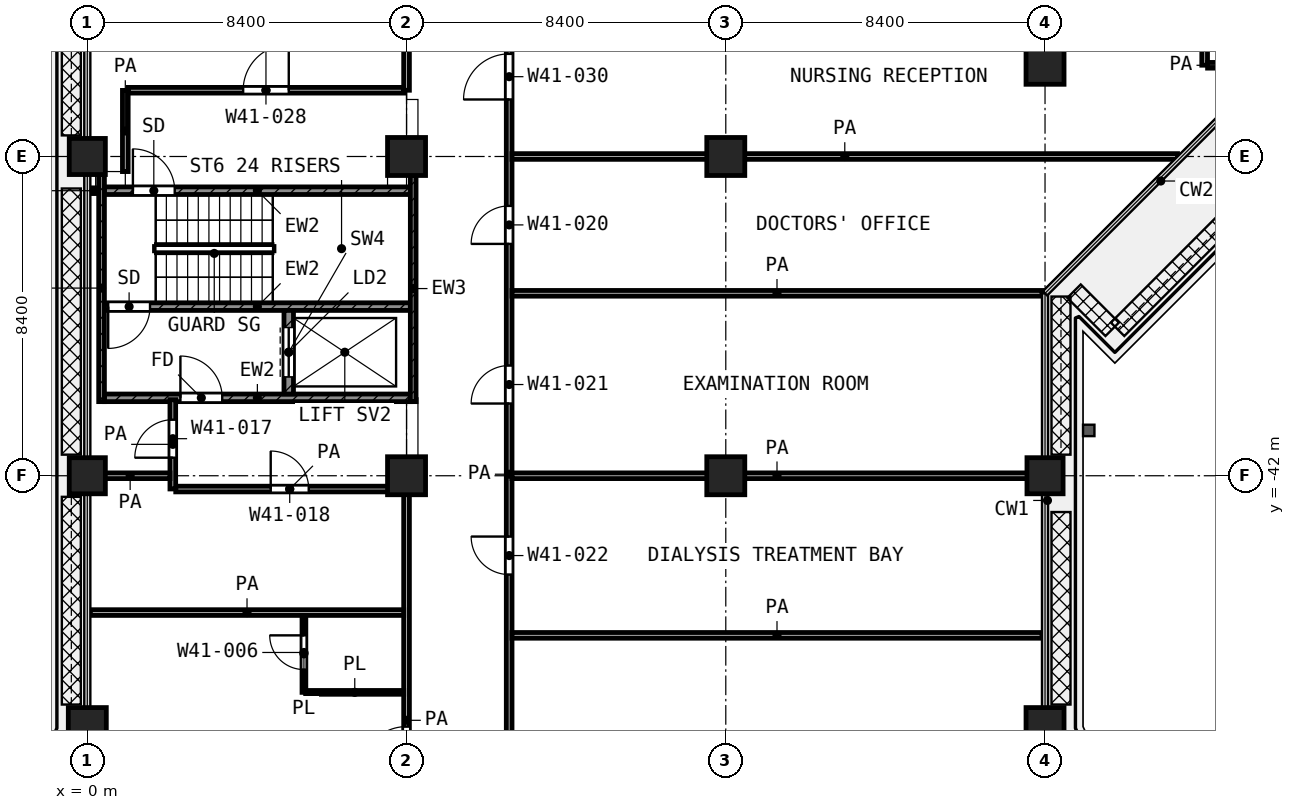
"""IFC4 building model, lengths in metres.
Left out: names, types, materials, properties, quantities, classifications, styles, units other than length and angle.
Written with IfcOpenShell. Run it as: python <this file> out.ifc"""

import sys

from ifc_helpers import new_model, si_unit, direction, frame, frame_2d, origin, origin_2d, place, context, subcontext, project, spatial, rectangle, extrude, element, fill, save


model = new_model("IFC4")
c1 = context("Model", 3, precision=1e-05, world=origin(), true_north=direction((0.0, 1.0)))
c2 = subcontext(c1, "Body", "Model", "MODEL_VIEW")
j1 = project(units=[si_unit("LENGTHUNIT", "METRE"), si_unit("PLANEANGLEUNIT", "RADIAN")], contexts=[c1])
p1 = place(None, origin())
s1 = spatial("IfcSite", under=j1, at=p1, CompositionType="ELEMENT")
p2 = place(p1, origin())
s2 = spatial("IfcBuilding", under=s1, at=p2, CompositionType="ELEMENT")
p3 = place(p2, frame((0.0, 0.0, 200.4)))
s3 = spatial("IfcBuildingStorey", under=s2, at=p3, CompositionType="ELEMENT", Elevation=200.4)
p4 = place(p3, frame((25.2, -31.2, 0.0), z_axis=(0.0, 0.0, 1.0), x_axis=(1.0, 0.0, 0.0)))
e1 = element("IfcColumn", 1, at=p4, inside=s3, PredefinedType="COLUMN", context=c2, shape_type="SweptSolid", body=[
    extrude(rectangle(XDim=1.0, YDim=1.0, at=origin_2d()), origin(), (0.0, 0.0, 1.0), 4.2),
])
p5 = place(p3, frame((0.0, -33.6, 0.0), z_axis=(0.0, 0.0, 1.0), x_axis=(1.0, 0.0, 0.0)))
e2 = element("IfcColumn", 2, at=p5, inside=s3, PredefinedType="COLUMN", context=c2, shape_type="SweptSolid", body=[
    extrude(rectangle(XDim=0.95, YDim=0.95, at=origin_2d()), origin(), (0.0, 0.0, 1.0), 4.2),
])
for number, where, z_axis, x_axis in (
    (3, (8.4, -33.6, 0.0), (0.0, 0.0, 1.0), (1.0, 0.0, 0.0)),
    (4, (16.8, -33.6, 0.0), (0.0, 0.0, 1.0), (1.0, 0.0, 0.0)),
):
    element("IfcColumn", number, at=place(p3, frame(where, z_axis=z_axis, x_axis=x_axis)), inside=s3, PredefinedType="COLUMN", context=c2, shape_type="SweptSolid", body=[
        extrude(rectangle(XDim=1.0, YDim=1.0, at=origin_2d()), origin(), (0.0, 0.0, 1.0), 4.2),
    ])
p6 = place(p3, frame((0.0, -42.0, 0.0), z_axis=(0.0, 0.0, 1.0), x_axis=(1.0, 0.0, 0.0)))
e5 = element("IfcColumn", 5, at=p6, inside=s3, PredefinedType="COLUMN", context=c2, shape_type="SweptSolid", body=[
    extrude(rectangle(XDim=0.95, YDim=0.95, at=origin_2d()), origin(), (0.0, 0.0, 1.0), 4.2),
])
for number, where, z_axis, x_axis in (
    (6, (8.4, -42.0, 0.0), (0.0, 0.0, 1.0), (1.0, 0.0, 0.0)),
    (7, (16.8, -42.0, 0.0), (0.0, 0.0, 1.0), (1.0, 0.0, 0.0)),
):
    element("IfcColumn", number, at=place(p3, frame(where, z_axis=z_axis, x_axis=x_axis)), inside=s3, PredefinedType="COLUMN", context=c2, shape_type="SweptSolid", body=[
        extrude(rectangle(XDim=1.0, YDim=1.0, at=origin_2d()), origin(), (0.0, 0.0, 1.0), 4.2),
    ])
p7 = place(p3, frame((25.2, -42.0, 0.0), z_axis=(0.0, 0.0, 1.0), x_axis=(1.0, 0.0, 0.0)))
e8 = element("IfcColumn", 8, at=p7, inside=s3, PredefinedType="COLUMN", context=c2, shape_type="SweptSolid", body=[
    extrude(rectangle(XDim=0.95, YDim=0.95, at=origin_2d()), origin(), (0.0, 0.0, 1.0), 4.2),
])
for number, where, z_axis, x_axis in (
    (9, (0.0, -48.6, 0.0), (0.0, 0.0, 1.0), (1.0, 0.0, 0.0)),
    (10, (25.2, -48.6, 0.0), (0.0, 0.0, 1.0), (1.0, 0.0, 0.0)),
):
    element("IfcColumn", number, at=place(p3, frame(where, z_axis=z_axis, x_axis=x_axis)), inside=s3, PredefinedType="COLUMN", context=c2, shape_type="SweptSolid", body=[
        extrude(rectangle(XDim=1.0, YDim=1.0, at=origin_2d()), origin(), (0.0, 0.0, 1.0), 4.2),
    ])
p8 = place(p3, frame((0.375, -40.05, 0.0), z_axis=(0.0, 0.0, 1.0), x_axis=(0.0, 1.0, 0.0)))
e11 = element("IfcWall", 11, at=p8, inside=s3, PredefinedType="SHEAR", context=c2, shape_type="SweptSolid", body=[
    extrude(rectangle(XDim=5.975, YDim=0.15, at=frame_2d((2.988, 0.0))), origin(), (0.0, 0.0, 1.0), 3.6),
])
p9 = place(p3, frame((8.575, -40.05, 0.0), z_axis=(0.0, 0.0, 1.0), x_axis=(0.0, 1.0, 0.0)))
e12 = element("IfcWall", 12, at=p9, inside=s3, PredefinedType="SHEAR", context=c2, shape_type="SweptSolid", body=[
    extrude(rectangle(XDim=5.95, YDim=0.15, at=frame_2d((2.975, 0.0))), origin(), (0.0, 0.0, 1.0), 3.6),
])
p10 = place(p3, frame((0.45, -34.5, 0.0), z_axis=(0.0, 0.0, 1.0), x_axis=(1.0, 0.0, 0.0)))
e13 = element("IfcWall", 13, at=p10, inside=s3, PredefinedType="SHEAR", context=c2, shape_type="SweptSolid", body=[
    extrude(rectangle(XDim=8.05, YDim=0.2, at=frame_2d((4.025, 0.0))), origin(), (0.0, 0.0, 1.0), 3.6),
])
p11 = place(p10, frame((0.75, 0.0, 0.0)))
e14 = element("IfcOpeningElement", 14, at=p11, cuts=e13, PredefinedType="OPENING", context=c2, shape_type="SweptSolid", body=[
    extrude(rectangle(XDim=1.1, YDim=2.1, at=frame_2d((0.55, 1.05))), frame((0.0, 0.11, 0.0), z_axis=(0.0, -1.0, 0.0), x_axis=(1.0, 0.0, 0.0)), (0.0, 0.0, 1.0), 0.22),
])
p12 = place(p3, frame((0.45, -37.55, 0.0), z_axis=(0.0, 0.0, 1.0), x_axis=(1.0, 0.0, 0.0)))
e15 = element("IfcWall", 15, at=p12, inside=s3, PredefinedType="SHEAR", context=c2, shape_type="SweptSolid", body=[
    extrude(rectangle(XDim=8.05, YDim=0.2, at=frame_2d((4.025, 0.0))), origin(), (0.0, 0.0, 1.0), 3.6),
])
p13 = place(p12, frame((0.1, 0.0, 0.0)))
e16 = element("IfcOpeningElement", 16, at=p13, cuts=e15, PredefinedType="OPENING", context=c2, shape_type="SweptSolid", body=[
    extrude(rectangle(XDim=1.1, YDim=2.1, at=frame_2d((0.55, 1.05))), frame((0.0, 0.11, 0.0), z_axis=(0.0, -1.0, 0.0), x_axis=(1.0, 0.0, 0.0)), (0.0, 0.0, 1.0), 0.22),
])
p14 = place(p3, frame((0.45, -39.95, 0.0), z_axis=(0.0, 0.0, 1.0), x_axis=(1.0, 0.0, 0.0)))
e17 = element("IfcWall", 17, at=p14, inside=s3, PredefinedType="SHEAR", context=c2, shape_type="SweptSolid", body=[
    extrude(rectangle(XDim=8.05, YDim=0.2, at=frame_2d((4.025, 0.0))), origin(), (0.0, 0.0, 1.0), 3.6),
])
p15 = place(p14, frame((2.0, 0.0, 0.0)))
e18 = element("IfcOpeningElement", 18, at=p15, cuts=e17, PredefinedType="OPENING", context=c2, shape_type="SweptSolid", body=[
    extrude(rectangle(XDim=1.1, YDim=2.1, at=frame_2d((0.55, 1.05))), frame((0.0, 0.11, 0.0), z_axis=(0.0, -1.0, 0.0), x_axis=(1.0, 0.0, 0.0)), (0.0, 0.0, 1.0), 0.22),
])
p16 = place(p3, frame((5.3, -39.85, 0.0), z_axis=(0.0, 0.0, 1.0), x_axis=(0.0, 1.0, 0.0)))
e19 = element("IfcWall", 19, at=p16, inside=s3, PredefinedType="SHEAR", context=c2, shape_type="SweptSolid", body=[
    extrude(rectangle(XDim=2.2, YDim=0.25, at=frame_2d((1.1, 0.0))), origin(), (0.0, 0.0, 1.0), 3.6),
])
p17 = place(p16, frame((0.45, 0.0, 0.0)))
e20 = element("IfcOpeningElement", 20, at=p17, cuts=e19, PredefinedType="OPENING", context=c2, shape_type="SweptSolid", body=[
    extrude(rectangle(XDim=1.3, YDim=2.1, at=frame_2d((0.65, 1.05))), frame((0.0, 0.135, 0.0), z_axis=(0.0, -1.0, 0.0), x_axis=(1.0, 0.0, 0.0)), (0.0, 0.0, 1.0), 0.27),
])
p18 = place(p3, frame((5.75, -47.7, 0.0), z_axis=(0.0, 0.0, 1.0), x_axis=(1.0, 0.0, 0.0)))
e21 = element("IfcWall", 21, at=p18, inside=s3, PredefinedType="PARTITIONING", context=c2, shape_type="SweptSolid", body=[
    extrude(rectangle(XDim=2.575, YDim=0.1, at=frame_2d((1.288, 0.0))), origin(), (0.0, 0.0, 1.0), 3.6),
])
p19 = place(p3, frame((5.7, -47.7, 0.0), z_axis=(0.0, 0.0, 1.0), x_axis=(0.0, 1.0, 0.0)))
e22 = element("IfcWall", 22, at=p19, inside=s3, PredefinedType="PARTITIONING", context=c2, shape_type="SweptSolid", body=[
    extrude(rectangle(XDim=2.025, YDim=0.1, at=frame_2d((1.012, 0.0))), origin(), (0.0, 0.0, 1.0), 3.6),
])
p20 = place(p19, frame((0.6, 0.0, 0.0)))
e23 = element("IfcOpeningElement", 23, at=p20, cuts=e22, PredefinedType="OPENING", context=c2, shape_type="SweptSolid", body=[
    extrude(rectangle(XDim=0.9, YDim=2.1, at=frame_2d((0.45, 1.05))), frame((0.0, 0.06, 0.0), z_axis=(0.0, -1.0, 0.0), x_axis=(1.0, 0.0, 0.0)), (0.0, 0.0, 1.0), 0.12),
])
p21 = place(p3, frame((11.175, -46.2, 0.0), z_axis=(0.0, 0.0, 1.0), x_axis=(1.0, 0.0, 0.0)))
e24 = element("IfcWall", 24, at=p21, inside=s3, PredefinedType="PARTITIONING", context=c2, shape_type="SweptSolid", body=[
    extrude(rectangle(XDim=13.945, YDim=0.15, at=frame_2d((6.973, 0.0))), origin(), (0.0, 0.0, 1.0), 3.6),
])
p22 = place(p3, frame((0.08, -45.6, 0.0), z_axis=(0.0, 0.0, 1.0), x_axis=(1.0, 0.0, 0.0)))
e25 = element("IfcWall", 25, at=p22, inside=s3, PredefinedType="PARTITIONING", context=c2, shape_type="SweptSolid", body=[
    extrude(rectangle(XDim=8.245, YDim=0.15, at=frame_2d((4.123, 0.0))), origin(), (0.0, 0.0, 1.0), 3.6),
])
p23 = place(p3, frame((2.327, -42.35, 0.0), z_axis=(0.0, 0.0, 1.0), x_axis=(1.0, 0.0, 0.0)))
e26 = element("IfcWall", 26, at=p23, inside=s3, PredefinedType="PARTITIONING", context=c2, shape_type="SweptSolid", body=[
    extrude(rectangle(XDim=5.998, YDim=0.15, at=frame_2d((2.999, 0.0))), origin(), (0.0, 0.0, 1.0), 3.6),
])
p24 = place(p23, frame((2.499, 0.0, 0.0)))
e27 = element("IfcOpeningElement", 27, at=p24, cuts=e26, PredefinedType="OPENING", context=c2, shape_type="SweptSolid", body=[
    extrude(rectangle(XDim=1.0, YDim=2.1, at=frame_2d((0.5, 1.05))), frame((0.0, 0.085, 0.0), z_axis=(0.0, -1.0, 0.0), x_axis=(1.0, 0.0, 0.0)), (0.0, 0.0, 1.0), 0.17),
])
p25 = place(p3, frame((0.08, -42.0, 0.0), z_axis=(0.0, 0.0, 1.0), x_axis=(1.0, 0.0, 0.0)))
e28 = element("IfcWall", 28, at=p25, inside=s3, PredefinedType="PARTITIONING", context=c2, shape_type="SweptSolid", body=[
    extrude(rectangle(XDim=2.095, YDim=0.15, at=frame_2d((1.047, 0.0))), origin(), (0.0, 0.0, 1.0), 3.6),
])
for number, where, z_axis, x_axis in (
    (29, (11.175, -42.0, 0.0), (0.0, 0.0, 1.0), (1.0, 0.0, 0.0)),
    (30, (11.175, -37.2, 0.0), (0.0, 0.0, 1.0), (1.0, 0.0, 0.0)),
):
    element("IfcWall", number, at=place(p3, frame(where, z_axis=z_axis, x_axis=x_axis)), inside=s3, PredefinedType="PARTITIONING", context=c2, shape_type="SweptSolid", body=[
        extrude(rectangle(XDim=13.945, YDim=0.15, at=frame_2d((6.973, 0.0))), origin(), (0.0, 0.0, 1.0), 3.6),
    ])
p26 = place(p3, frame((0.08, -34.5, 0.0), z_axis=(0.0, 0.0, 1.0), x_axis=(1.0, 0.0, 0.0)))
e31 = element("IfcWall", 31, at=p26, inside=s3, PredefinedType="PARTITIONING", context=c2, shape_type="SweptSolid", body=[
    extrude(rectangle(XDim=0.19, YDim=0.15, at=frame_2d((0.095, 0.0))), origin(), (0.0, 0.0, 1.0), 3.6),
])
p27 = place(p3, frame((11.175, -33.6, 0.0), z_axis=(0.0, 0.0, 1.0), x_axis=(1.0, 0.0, 0.0)))
e32 = element("IfcWall", 32, at=p27, inside=s3, PredefinedType="PARTITIONING", context=c2, shape_type="SweptSolid", body=[
    extrude(rectangle(XDim=17.512, YDim=0.15, at=frame_2d((8.756, 0.0))), origin(), (0.0, 0.0, 1.0), 3.6),
])
p28 = place(p3, frame((1.077, -31.857, 0.0), z_axis=(0.0, 0.0, 1.0), x_axis=(1.0, 0.0, 0.0)))
e33 = element("IfcWall", 33, at=p28, inside=s3, PredefinedType="PARTITIONING", context=c2, shape_type="SweptSolid", body=[
    extrude(rectangle(XDim=7.248, YDim=0.15, at=frame_2d((3.624, 0.0))), origin(), (0.0, 0.0, 1.0), 3.6),
])
p29 = place(p28, frame((3.024, 0.0, 0.0)))
e34 = element("IfcOpeningElement", 34, at=p29, cuts=e33, PredefinedType="OPENING", context=c2, shape_type="SweptSolid", body=[
    extrude(rectangle(XDim=1.2, YDim=2.1, at=frame_2d((0.6, 1.05))), frame((0.0, 0.085, 0.0), z_axis=(0.0, -1.0, 0.0), x_axis=(1.0, 0.0, 0.0)), (0.0, 0.0, 1.0), 0.17),
])
p30 = place(p3, frame((29.477, -31.2, 0.0), z_axis=(0.0, 0.0, 1.0), x_axis=(1.0, 0.0, 0.0)))
e35 = element("IfcWall", 35, at=p30, inside=s3, PredefinedType="PARTITIONING", context=c2, shape_type="SweptSolid", body=[
    extrude(rectangle(XDim=1.61, YDim=0.15, at=frame_2d((0.805, 0.0))), origin(), (0.0, 0.0, 1.0), 3.6),
])
p31 = place(p3, frame((1.0, -33.997, 0.0), z_axis=(0.0, 0.0, 1.0), x_axis=(0.0, 1.0, 0.0)))
e36 = element("IfcWall", 36, at=p31, inside=s3, PredefinedType="PARTITIONING", context=c2, shape_type="SweptSolid", body=[
    extrude(rectangle(XDim=2.136, YDim=0.15, at=frame_2d((1.068, 0.0))), origin(), (0.0, 0.0, 1.0), 3.6),
])
p32 = place(p3, frame((2.25, -42.348, 0.0), z_axis=(0.0, 0.0, 1.0), x_axis=(0.0, 1.0, 0.0)))
e37 = element("IfcWall", 37, at=p32, inside=s3, PredefinedType="PARTITIONING", context=c2, shape_type="SweptSolid", body=[
    extrude(rectangle(XDim=2.348, YDim=0.15, at=frame_2d((1.174, 0.0))), origin(), (0.0, 0.0, 1.0), 3.6),
])
p33 = place(p32, frame((0.823, 0.0, 0.0)))
e38 = element("IfcOpeningElement", 38, at=p33, cuts=e37, PredefinedType="OPENING", context=c2, shape_type="SweptSolid", body=[
    extrude(rectangle(XDim=1.0, YDim=2.1, at=frame_2d((0.5, 1.05))), frame((0.0, 0.085, 0.0), z_axis=(0.0, -1.0, 0.0), x_axis=(1.0, 0.0, 0.0)), (0.0, 0.0, 1.0), 0.17),
])
p34 = place(p3, frame((8.4, -54.52, 0.0), z_axis=(0.0, 0.0, 1.0), x_axis=(0.0, 1.0, 0.0)))
e39 = element("IfcWall", 39, at=p34, inside=s3, PredefinedType="PARTITIONING", context=c2, shape_type="SweptSolid", body=[
    extrude(rectangle(XDim=12.17, YDim=0.15, at=frame_2d((6.085, 0.0))), origin(), (0.0, 0.0, 1.0), 3.6),
])
p35 = place(p34, frame((4.72, 0.0, 0.0)))
e40 = element("IfcOpeningElement", 40, at=p35, cuts=e39, PredefinedType="OPENING", context=c2, shape_type="SweptSolid", body=[
    extrude(rectangle(XDim=1.2, YDim=2.1, at=frame_2d((0.6, 1.05))), frame((0.0, 0.085, 0.0), z_axis=(0.0, -1.0, 0.0), x_axis=(1.0, 0.0, 0.0)), (0.0, 0.0, 1.0), 0.17),
])
p36 = place(p34, frame((1.52, 0.0, 0.0)))
e41 = element("IfcOpeningElement", 41, at=p36, cuts=e39, PredefinedType="OPENING", context=c2, shape_type="SweptSolid", body=[
    extrude(rectangle(XDim=1.0, YDim=2.1, at=frame_2d((0.5, 1.05))), frame((0.0, 0.085, 0.0), z_axis=(0.0, -1.0, 0.0), x_axis=(1.0, 0.0, 0.0)), (0.0, 0.0, 1.0), 0.17),
])
p37 = place(p3, frame((8.4, -31.857, 0.0), z_axis=(0.0, 0.0, 1.0), x_axis=(0.0, 1.0, 0.0)))
e42 = element("IfcWall", 42, at=p37, inside=s3, PredefinedType="PARTITIONING", context=c2, shape_type="SweptSolid", body=[
    extrude(rectangle(XDim=6.957, YDim=0.15, at=frame_2d((3.479, 0.0))), origin(), (0.0, 0.0, 1.0), 3.6),
])
p38 = place(p3, frame((11.1, -54.52, 0.0), z_axis=(0.0, 0.0, 1.0), x_axis=(0.0, 1.0, 0.0)))
e43 = element("IfcWall", 43, at=p38, inside=s3, PredefinedType="PARTITIONING", context=c2, shape_type="SweptSolid", body=[
    extrude(rectangle(XDim=25.12, YDim=0.15, at=frame_2d((12.56, 0.0))), origin(), (0.0, 0.0, 1.0), 3.6),
])
p39 = place(p38, frame((22.42, 0.0, 0.0)))
e44 = element("IfcOpeningElement", 44, at=p39, cuts=e43, PredefinedType="OPENING", context=c2, shape_type="SweptSolid", body=[
    extrude(rectangle(XDim=1.2, YDim=2.1, at=frame_2d((0.6, 1.05))), frame((0.0, 0.085, 0.0), z_axis=(0.0, -1.0, 0.0), x_axis=(1.0, 0.0, 0.0)), (0.0, 0.0, 1.0), 0.17),
])
p40 = place(p38, frame((18.62, 0.0, 0.0)))
e45 = element("IfcOpeningElement", 45, at=p40, cuts=e43, PredefinedType="OPENING", context=c2, shape_type="SweptSolid", body=[
    extrude(rectangle(XDim=1.0, YDim=2.1, at=frame_2d((0.5, 1.05))), frame((0.0, 0.085, 0.0), z_axis=(0.0, -1.0, 0.0), x_axis=(1.0, 0.0, 0.0)), (0.0, 0.0, 1.0), 0.17),
])
p41 = place(p38, frame((14.42, 0.0, 0.0)))
e46 = element("IfcOpeningElement", 46, at=p41, cuts=e43, PredefinedType="OPENING", context=c2, shape_type="SweptSolid", body=[
    extrude(rectangle(XDim=1.0, YDim=2.1, at=frame_2d((0.5, 1.05))), frame((0.0, 0.085, 0.0), z_axis=(0.0, -1.0, 0.0), x_axis=(1.0, 0.0, 0.0)), (0.0, 0.0, 1.0), 0.17),
])
p42 = place(p38, frame((9.92, 0.0, 0.0)))
e47 = element("IfcOpeningElement", 47, at=p42, cuts=e43, PredefinedType="OPENING", context=c2, shape_type="SweptSolid", body=[
    extrude(rectangle(XDim=1.0, YDim=2.1, at=frame_2d((0.5, 1.05))), frame((0.0, 0.085, 0.0), z_axis=(0.0, -1.0, 0.0), x_axis=(1.0, 0.0, 0.0)), (0.0, 0.0, 1.0), 0.17),
])
p43 = place(p38, frame((3.37, 0.0, 0.0)))
e48 = element("IfcOpeningElement", 48, at=p43, cuts=e43, PredefinedType="OPENING", context=c2, shape_type="SweptSolid", body=[
    extrude(rectangle(XDim=1.5, YDim=2.1, at=frame_2d((0.75, 1.05))), frame((0.0, 0.085, 0.0), z_axis=(0.0, -1.0, 0.0), x_axis=(1.0, 0.0, 0.0)), (0.0, 0.0, 1.0), 0.17),
])
p44 = place(p3, frame((29.4, -31.198, 0.0), z_axis=(0.0, 0.0, 1.0), x_axis=(0.0, 1.0, 0.0)))
e49 = element("IfcWall", 49, at=p44, inside=s3, PredefinedType="PARTITIONING", context=c2, shape_type="SweptSolid", body=[
    extrude(rectangle(XDim=20.098, YDim=0.15, at=frame_2d((10.049, 0.0))), origin(), (0.0, 0.0, 1.0), 3.6),
])
p45 = place(p11, origin())
e50 = element("IfcDoor", 50, at=p45, inside=s3, OperationType="SINGLE_SWING_LEFT", PredefinedType="DOOR", context=c2, shape_type="SweptSolid", body=[
    extrude(rectangle(XDim=1.1, YDim=2.1, at=frame_2d((0.55, 1.05))), frame((0.0, 0.025, 0.0), z_axis=(0.0, -1.0, 0.0), x_axis=(1.0, 0.0, 0.0)), (0.0, 0.0, 1.0), 0.05),
])
fill(e14, e50)
p46 = place(p13, frame((1.1, 0.0, 0.0), z_axis=(0.0, 0.0, 1.0), x_axis=(-1.0, 0.0, 0.0)))
e51 = element("IfcDoor", 51, at=p46, inside=s3, OperationType="SINGLE_SWING_LEFT", PredefinedType="DOOR", context=c2, shape_type="SweptSolid", body=[
    extrude(rectangle(XDim=1.1, YDim=2.1, at=frame_2d((0.55, 1.05))), frame((0.0, 0.025, 0.0), z_axis=(0.0, -1.0, 0.0), x_axis=(1.0, 0.0, 0.0)), (0.0, 0.0, 1.0), 0.05),
])
fill(e16, e51)
p47 = place(p17, origin())
e52 = element("IfcDoor", 52, at=p47, inside=s3, OperationType="DOUBLE_DOOR_SLIDING", PredefinedType="DOOR", context=c2, shape_type="SweptSolid", body=[
    extrude(rectangle(XDim=1.3, YDim=2.1, at=frame_2d((0.65, 1.05))), frame((0.0, 0.025, 0.0), z_axis=(0.0, -1.0, 0.0), x_axis=(1.0, 0.0, 0.0)), (0.0, 0.0, 1.0), 0.05),
])
fill(e20, e52)
p48 = place(p15, origin())
e53 = element("IfcDoor", 53, at=p48, inside=s3, OperationType="SINGLE_SWING_LEFT", PredefinedType="DOOR", context=c2, shape_type="SweptSolid", body=[
    extrude(rectangle(XDim=1.1, YDim=2.1, at=frame_2d((0.55, 1.05))), frame((0.0, 0.025, 0.0), z_axis=(0.0, -1.0, 0.0), x_axis=(1.0, 0.0, 0.0)), (0.0, 0.0, 1.0), 0.05),
])
fill(e18, e53)
p49 = place(p29, origin())
e54 = element("IfcDoor", 54, at=p49, inside=s3, OperationType="SINGLE_SWING_RIGHT", PredefinedType="DOOR", context=c2, shape_type="SweptSolid", body=[
    extrude(rectangle(XDim=1.2, YDim=2.1, at=frame_2d((0.6, 1.05))), frame((0.0, 0.025, 0.0), z_axis=(0.0, -1.0, 0.0), x_axis=(1.0, 0.0, 0.0)), (0.0, 0.0, 1.0), 0.05),
])
fill(e34, e54)
p50 = place(p33, origin())
e55 = element("IfcDoor", 55, at=p50, inside=s3, OperationType="SINGLE_SWING_LEFT", PredefinedType="DOOR", context=c2, shape_type="SweptSolid", body=[
    extrude(rectangle(XDim=1.0, YDim=2.1, at=frame_2d((0.5, 1.05))), frame((0.0, 0.025, 0.0), z_axis=(0.0, -1.0, 0.0), x_axis=(1.0, 0.0, 0.0)), (0.0, 0.0, 1.0), 0.05),
])
fill(e38, e55)
p51 = place(p24, origin())
e56 = element("IfcDoor", 56, at=p51, inside=s3, OperationType="SINGLE_SWING_LEFT", PredefinedType="DOOR", context=c2, shape_type="SweptSolid", body=[
    extrude(rectangle(XDim=1.0, YDim=2.1, at=frame_2d((0.5, 1.05))), frame((0.0, 0.025, 0.0), z_axis=(0.0, -1.0, 0.0), x_axis=(1.0, 0.0, 0.0)), (0.0, 0.0, 1.0), 0.05),
])
fill(e27, e56)
p52 = place(p35, origin())
e57 = element("IfcDoor", 57, at=p52, inside=s3, OperationType="SINGLE_SWING_LEFT", PredefinedType="DOOR", context=c2, shape_type="SweptSolid", body=[
    extrude(rectangle(XDim=1.2, YDim=2.1, at=frame_2d((0.6, 1.05))), frame((0.0, 0.025, 0.0), z_axis=(0.0, -1.0, 0.0), x_axis=(1.0, 0.0, 0.0)), (0.0, 0.0, 1.0), 0.05),
])
fill(e40, e57)
p53 = place(p20, origin())
e58 = element("IfcDoor", 58, at=p53, inside=s3, OperationType="SINGLE_SWING_RIGHT", PredefinedType="DOOR", context=c2, shape_type="SweptSolid", body=[
    extrude(rectangle(XDim=0.9, YDim=2.1, at=frame_2d((0.45, 1.05))), frame((0.0, 0.025, 0.0), z_axis=(0.0, -1.0, 0.0), x_axis=(1.0, 0.0, 0.0)), (0.0, 0.0, 1.0), 0.05),
])
fill(e23, e58)
p54 = place(p39, origin())
e59 = element("IfcDoor", 59, at=p54, inside=s3, OperationType="SINGLE_SWING_LEFT", PredefinedType="DOOR", context=c2, shape_type="SweptSolid", body=[
    extrude(rectangle(XDim=1.2, YDim=2.1, at=frame_2d((0.6, 1.05))), frame((0.0, 0.025, 0.0), z_axis=(0.0, -1.0, 0.0), x_axis=(1.0, 0.0, 0.0)), (0.0, 0.0, 1.0), 0.05),
])
fill(e44, e59)
p55 = place(p40, origin())
e60 = element("IfcDoor", 60, at=p55, inside=s3, OperationType="SINGLE_SWING_LEFT", PredefinedType="DOOR", context=c2, shape_type="SweptSolid", body=[
    extrude(rectangle(XDim=1.0, YDim=2.1, at=frame_2d((0.5, 1.05))), frame((0.0, 0.025, 0.0), z_axis=(0.0, -1.0, 0.0), x_axis=(1.0, 0.0, 0.0)), (0.0, 0.0, 1.0), 0.05),
])
fill(e45, e60)
p56 = place(p41, origin())
e61 = element("IfcDoor", 61, at=p56, inside=s3, OperationType="SINGLE_SWING_LEFT", PredefinedType="DOOR", context=c2, shape_type="SweptSolid", body=[
    extrude(rectangle(XDim=1.0, YDim=2.1, at=frame_2d((0.5, 1.05))), frame((0.0, 0.025, 0.0), z_axis=(0.0, -1.0, 0.0), x_axis=(1.0, 0.0, 0.0)), (0.0, 0.0, 1.0), 0.05),
])
fill(e46, e61)
p57 = place(p42, origin())
e62 = element("IfcDoor", 62, at=p57, inside=s3, OperationType="SINGLE_SWING_RIGHT", PredefinedType="DOOR", context=c2, shape_type="SweptSolid", body=[
    extrude(rectangle(XDim=1.0, YDim=2.1, at=frame_2d((0.5, 1.05))), frame((0.0, 0.025, 0.0), z_axis=(0.0, -1.0, 0.0), x_axis=(1.0, 0.0, 0.0)), (0.0, 0.0, 1.0), 0.05),
])
fill(e47, e62)
save(model, sys.argv[1])
